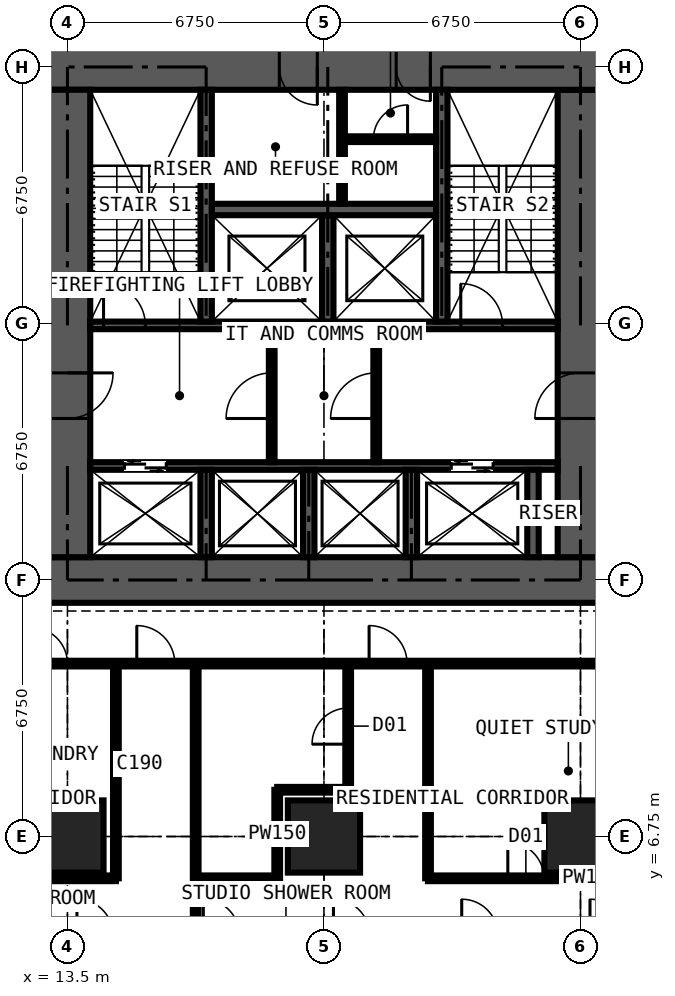
"""IFC4 building model, lengths in metres.
Left out: names, types, materials, properties, quantities, classifications, styles, units other than length and angle.
Written with IfcOpenShell. Run it as: python <this file> out.ifc"""

import sys

from ifc_helpers import new_model, si_unit, direction, frame, frame_2d, origin, origin_2d, place, context, subcontext, project, spatial, rectangle, extrude, element, fill, save


model = new_model("IFC4")
c1 = context("Model", 3, precision=1e-05, world=origin(), true_north=direction((0.0, 1.0)))
c2 = subcontext(c1, "Body", "Model", "MODEL_VIEW")
j1 = project(units=[si_unit("LENGTHUNIT", "METRE"), si_unit("PLANEANGLEUNIT", "RADIAN")], contexts=[c1])
p1 = place(None, origin())
s1 = spatial("IfcSite", under=j1, at=p1, CompositionType="ELEMENT")
p2 = place(p1, origin())
s2 = spatial("IfcBuilding", under=s1, at=p2, CompositionType="ELEMENT")
p3 = place(p2, frame((0.0, 0.0, 36.0)))
s3 = spatial("IfcBuildingStorey", under=s2, at=p3, CompositionType="ELEMENT", Elevation=36.0)
for number, where, z_axis, x_axis in (
    (1, (13.5, 6.75, 0.0), (0.0, 0.0, 1.0), (1.0, 0.0, 0.0)),
    (2, (20.25, 6.75, 0.0), (0.0, 0.0, 1.0), (1.0, 0.0, 0.0)),
    (3, (27.0, 6.75, 0.0), (0.0, 0.0, 1.0), (1.0, 0.0, 0.0)),
):
    element("IfcColumn", number, at=place(p3, frame(where, z_axis=z_axis, x_axis=x_axis)), inside=s3, PredefinedType="COLUMN", context=c2, shape_type="SweptSolid", body=[
        extrude(rectangle(XDim=1.9, YDim=1.9, at=origin_2d()), origin(), (0.0, 0.0, 1.0), 3.6),
    ])
p4 = place(p3, frame((12.9, 13.5, 0.0), z_axis=(0.0, 0.0, 1.0), x_axis=(1.0, 0.0, 0.0)))
e4 = element("IfcWall", 4, at=p4, inside=s3, PredefinedType="SHEAR", context=c2, shape_type="SweptSolid", body=[
    extrude(rectangle(XDim=14.7, YDim=1.2, at=frame_2d((7.35, 0.0))), origin(), (0.0, 0.0, 1.0), 3.6),
])
p5 = place(p3, frame((27.0, 14.1, 0.0), z_axis=(0.0, 0.0, 1.0), x_axis=(0.0, 1.0, 0.0)))
e5 = element("IfcWall", 5, at=p5, inside=s3, PredefinedType="SHEAR", context=c2, shape_type="SweptSolid", body=[
    extrude(rectangle(XDim=12.3, YDim=1.2, at=frame_2d((6.15, 0.0))), origin(), (0.0, 0.0, 1.0), 3.6),
])
p6 = place(p5, frame((3.65, 0.0, 0.0)))
e6 = element("IfcOpeningElement", 6, at=p6, cuts=e5, PredefinedType="OPENING", context=c2, shape_type="SweptSolid", body=[
    extrude(rectangle(XDim=1.2, YDim=2.2, at=frame_2d((0.6, 1.1))), frame((0.0, 0.61, 0.0), z_axis=(0.0, -1.0, 0.0), x_axis=(1.0, 0.0, 0.0)), (0.0, 0.0, 1.0), 1.22),
])
p7 = place(p3, frame((27.6, 27.0, 0.0), z_axis=(0.0, 0.0, 1.0), x_axis=(-1.0, 0.0, 0.0)))
e7 = element("IfcWall", 7, at=p7, inside=s3, PredefinedType="SHEAR", context=c2, shape_type="SweptSolid", body=[
    extrude(rectangle(XDim=14.7, YDim=1.2, at=frame_2d((7.35, 0.0))), origin(), (0.0, 0.0, 1.0), 3.6),
])
p8 = place(p7, frame((4.55, 0.0, 0.0)))
e8 = element("IfcOpeningElement", 8, at=p8, cuts=e7, PredefinedType="OPENING", context=c2, shape_type="SweptSolid", body=[
    extrude(rectangle(XDim=0.9, YDim=2.2, at=frame_2d((0.45, 1.1))), frame((0.0, 0.61, 0.0), z_axis=(0.0, -1.0, 0.0), x_axis=(1.0, 0.0, 0.0)), (0.0, 0.0, 1.0), 1.22),
])
p9 = place(p7, frame((7.525, 0.0, 0.0)))
e9 = element("IfcOpeningElement", 9, at=p9, cuts=e7, PredefinedType="OPENING", context=c2, shape_type="SweptSolid", body=[
    extrude(rectangle(XDim=1.0, YDim=2.2, at=frame_2d((0.5, 1.1))), frame((0.0, 0.61, 0.0), z_axis=(0.0, -1.0, 0.0), x_axis=(1.0, 0.0, 0.0)), (0.0, 0.0, 1.0), 1.22),
])
p10 = place(p3, frame((13.5, 26.4, 0.0), z_axis=(0.0, 0.0, 1.0), x_axis=(0.0, -1.0, 0.0)))
e10 = element("IfcWall", 10, at=p10, inside=s3, PredefinedType="SHEAR", context=c2, shape_type="SweptSolid", body=[
    extrude(rectangle(XDim=12.3, YDim=1.2, at=frame_2d((6.15, 0.0))), origin(), (0.0, 0.0, 1.0), 3.6),
])
p11 = place(p10, frame((7.45, 0.0, 0.0)))
e11 = element("IfcOpeningElement", 11, at=p11, cuts=e10, PredefinedType="OPENING", context=c2, shape_type="SweptSolid", body=[
    extrude(rectangle(XDim=1.2, YDim=2.2, at=frame_2d((0.6, 1.1))), frame((0.0, 0.61, 0.0), z_axis=(0.0, -1.0, 0.0), x_axis=(1.0, 0.0, 0.0)), (0.0, 0.0, 1.0), 1.22),
])
p12 = place(p3, frame((14.1, 16.5, 0.0), z_axis=(0.0, 0.0, 1.0), x_axis=(1.0, 0.0, 0.0)))
e12 = element("IfcWall", 12, at=p12, inside=s3, PredefinedType="SHEAR", context=c2, shape_type="SweptSolid", body=[
    extrude(rectangle(XDim=12.3, YDim=0.2, at=frame_2d((6.15, 0.0))), origin(), (0.0, 0.0, 1.0), 3.6),
])
p13 = place(p12, frame((0.9, 0.0, 0.0)))
e13 = element("IfcOpeningElement", 13, at=p13, cuts=e12, PredefinedType="OPENING", context=c2, shape_type="SweptSolid", body=[
    extrude(rectangle(XDim=1.1, YDim=2.2, at=frame_2d((0.55, 1.1))), frame((0.0, 0.11, 0.0), z_axis=(0.0, -1.0, 0.0), x_axis=(1.0, 0.0, 0.0)), (0.0, 0.0, 1.0), 0.22),
])
p14 = place(p12, frame((9.5, 0.0, 0.0)))
e14 = element("IfcOpeningElement", 14, at=p14, cuts=e12, PredefinedType="OPENING", context=c2, shape_type="SweptSolid", body=[
    extrude(rectangle(XDim=1.1, YDim=2.2, at=frame_2d((0.55, 1.1))), frame((0.0, 0.11, 0.0), z_axis=(0.0, -1.0, 0.0), x_axis=(1.0, 0.0, 0.0)), (0.0, 0.0, 1.0), 0.22),
])
p15 = place(p3, frame((14.1, 20.2, 0.0), z_axis=(0.0, 0.0, 1.0), x_axis=(1.0, 0.0, 0.0)))
e15 = element("IfcWall", 15, at=p15, inside=s3, PredefinedType="SHEAR", context=c2, shape_type="SweptSolid", body=[
    extrude(rectangle(XDim=12.3, YDim=0.2, at=frame_2d((6.15, 0.0))), origin(), (0.0, 0.0, 1.0), 3.6),
])
p16 = place(p15, frame((0.35, 0.0, 0.0)))
e16 = element("IfcOpeningElement", 16, at=p16, cuts=e15, PredefinedType="OPENING", context=c2, shape_type="SweptSolid", body=[
    extrude(rectangle(XDim=1.1, YDim=2.2, at=frame_2d((0.55, 1.1))), frame((0.0, 0.11, 0.0), z_axis=(0.0, -1.0, 0.0), x_axis=(1.0, 0.0, 0.0)), (0.0, 0.0, 1.0), 0.22),
])
p17 = place(p15, frame((9.75, 0.0, 0.0)))
e17 = element("IfcOpeningElement", 17, at=p17, cuts=e15, PredefinedType="OPENING", context=c2, shape_type="SweptSolid", body=[
    extrude(rectangle(XDim=1.1, YDim=2.2, at=frame_2d((0.55, 1.1))), frame((0.0, 0.11, 0.0), z_axis=(0.0, -1.0, 0.0), x_axis=(1.0, 0.0, 0.0)), (0.0, 0.0, 1.0), 0.22),
])
for number, where, z_axis, x_axis in (
    (18, (17.15, 20.3, 0.0), (0.0, 0.0, 1.0), (0.0, 1.0, 0.0)),
    (19, (23.35, 20.3, 0.0), (0.0, 0.0, 1.0), (0.0, 1.0, 0.0)),
):
    element("IfcWall", number, at=place(p3, frame(where, z_axis=z_axis, x_axis=x_axis)), inside=s3, PredefinedType="SHEAR", context=c2, shape_type="SweptSolid", body=[
        extrude(rectangle(XDim=6.1, YDim=0.3, at=frame_2d((3.05, 0.0))), origin(), (0.0, 0.0, 1.0), 3.6),
    ])
p18 = place(p3, frame((20.35, 20.3, 0.0), z_axis=(0.0, 0.0, 1.0), x_axis=(0.0, 1.0, 0.0)))
e20 = element("IfcWall", 20, at=p18, inside=s3, PredefinedType="SHEAR", context=c2, shape_type="SweptSolid", body=[
    extrude(rectangle(XDim=2.8, YDim=0.3, at=frame_2d((1.4, 0.0))), origin(), (0.0, 0.0, 1.0), 3.6),
])
p19 = place(p3, frame((17.3, 23.25, 0.0), z_axis=(0.0, 0.0, 1.0), x_axis=(1.0, 0.0, 0.0)))
e21 = element("IfcWall", 21, at=p19, inside=s3, PredefinedType="SHEAR", context=c2, shape_type="SweptSolid", body=[
    extrude(rectangle(XDim=5.9, YDim=0.3, at=frame_2d((2.95, 0.0))), origin(), (0.0, 0.0, 1.0), 3.6),
])
for number, where, z_axis, x_axis in (
    (22, (17.15, 14.1, 0.0), (0.0, 0.0, 1.0), (0.0, 1.0, 0.0)),
    (23, (19.85, 14.1, 0.0), (0.0, 0.0, 1.0), (0.0, 1.0, 0.0)),
    (24, (22.55, 14.1, 0.0), (0.0, 0.0, 1.0), (0.0, 1.0, 0.0)),
    (25, (25.75, 14.1, 0.0), (0.0, 0.0, 1.0), (0.0, 1.0, 0.0)),
):
    element("IfcWall", number, at=place(p3, frame(where, z_axis=z_axis, x_axis=x_axis)), inside=s3, PredefinedType="SHEAR", context=c2, shape_type="SweptSolid", body=[
        extrude(rectangle(XDim=2.3, YDim=0.3, at=frame_2d((1.15, 0.0))), origin(), (0.0, 0.0, 1.0), 3.6),
    ])
p20 = place(p3, frame((18.875, 16.6, 0.0), z_axis=(0.0, 0.0, 1.0), x_axis=(0.0, 1.0, 0.0)))
e26 = element("IfcWall", 26, at=p20, inside=s3, PredefinedType="PARTITIONING", context=c2, shape_type="SweptSolid", body=[
    extrude(rectangle(XDim=3.5, YDim=0.15, at=frame_2d((1.75, 0.0))), origin(), (0.0, 0.0, 1.0), 3.375),
])
p21 = place(p20, frame((1.15, 0.0, 0.0)))
e27 = element("IfcOpeningElement", 27, at=p21, cuts=e26, PredefinedType="OPENING", context=c2, shape_type="SweptSolid", body=[
    extrude(rectangle(XDim=1.2, YDim=2.2, at=frame_2d((0.6, 1.1))), frame((0.0, 0.085, 0.0), z_axis=(0.0, -1.0, 0.0), x_axis=(1.0, 0.0, 0.0)), (0.0, 0.0, 1.0), 0.17),
])
p22 = place(p3, frame((21.625, 16.6, 0.0), z_axis=(0.0, 0.0, 1.0), x_axis=(0.0, 1.0, 0.0)))
e28 = element("IfcWall", 28, at=p22, inside=s3, PredefinedType="PARTITIONING", context=c2, shape_type="SweptSolid", body=[
    extrude(rectangle(XDim=3.5, YDim=0.15, at=frame_2d((1.75, 0.0))), origin(), (0.0, 0.0, 1.0), 3.375),
])
p23 = place(p22, frame((1.15, 0.0, 0.0)))
e29 = element("IfcOpeningElement", 29, at=p23, cuts=e28, PredefinedType="OPENING", context=c2, shape_type="SweptSolid", body=[
    extrude(rectangle(XDim=1.2, YDim=2.2, at=frame_2d((0.6, 1.1))), frame((0.0, 0.085, 0.0), z_axis=(0.0, -1.0, 0.0), x_axis=(1.0, 0.0, 0.0)), (0.0, 0.0, 1.0), 0.17),
])
p24 = place(p3, frame((20.725, 23.4, 0.0), z_axis=(0.0, 0.0, 1.0), x_axis=(0.0, 1.0, 0.0)))
e30 = element("IfcWall", 30, at=p24, inside=s3, PredefinedType="PARTITIONING", context=c2, shape_type="SweptSolid", body=[
    extrude(rectangle(XDim=3.0, YDim=0.15, at=frame_2d((1.5, 0.0))), origin(), (0.0, 0.0, 1.0), 3.375),
])
p25 = place(p3, frame((20.8, 25.1, 0.0), z_axis=(0.0, 0.0, 1.0), x_axis=(1.0, 0.0, 0.0)))
e31 = element("IfcWall", 31, at=p25, inside=s3, PredefinedType="PARTITIONING", context=c2, shape_type="SweptSolid", body=[
    extrude(rectangle(XDim=2.4, YDim=0.15, at=frame_2d((1.2, 0.0))), origin(), (0.0, 0.0, 1.0), 3.375),
])
p26 = place(p25, frame((0.75, 0.0, 0.0)))
e32 = element("IfcOpeningElement", 32, at=p26, cuts=e31, PredefinedType="OPENING", context=c2, shape_type="SweptSolid", body=[
    extrude(rectangle(XDim=0.9, YDim=2.2, at=frame_2d((0.45, 1.1))), frame((0.0, 0.085, 0.0), z_axis=(0.0, -1.0, 0.0), x_axis=(1.0, 0.0, 0.0)), (0.0, 0.0, 1.0), 0.17),
])
p27 = place(p3, frame((9.2, 5.65, 0.0), z_axis=(0.0, 0.0, 1.0), x_axis=(1.0, 0.0, 0.0)))
e33 = element("IfcWall", 33, at=p27, inside=s3, PredefinedType="PARTITIONING", context=c2, shape_type="SweptSolid", body=[
    extrude(rectangle(XDim=5.575, YDim=0.15, at=frame_2d((2.788, 0.0))), origin(), (0.0, 0.0, 1.0), 3.375),
])
p28 = place(p3, frame((10.125, 11.3, 0.0), z_axis=(0.0, 0.0, 1.0), x_axis=(1.0, 0.0, 0.0)))
e34 = element("IfcWall", 34, at=p28, inside=s3, PredefinedType="PARTITIONING", context=c2, shape_type="SweptSolid", body=[
    extrude(rectangle(XDim=20.675, YDim=0.15, at=frame_2d((10.337, 0.0))), origin(), (0.0, 0.0, 1.0), 3.375),
])
p29 = place(p28, frame((5.2, 0.0, 0.0)))
e35 = element("IfcOpeningElement", 35, at=p29, cuts=e34, PredefinedType="OPENING", context=c2, shape_type="SweptSolid", body=[
    extrude(rectangle(XDim=1.0, YDim=2.2, at=frame_2d((0.5, 1.1))), frame((0.0, 0.085, 0.0), z_axis=(0.0, -1.0, 0.0), x_axis=(1.0, 0.0, 0.0)), (0.0, 0.0, 1.0), 0.17),
])
p30 = place(p28, frame((11.312, 0.0, 0.0)))
e36 = element("IfcOpeningElement", 36, at=p30, cuts=e34, PredefinedType="OPENING", context=c2, shape_type="SweptSolid", body=[
    extrude(rectangle(XDim=1.0, YDim=2.2, at=frame_2d((0.5, 1.1))), frame((0.0, 0.085, 0.0), z_axis=(0.0, -1.0, 0.0), x_axis=(1.0, 0.0, 0.0)), (0.0, 0.0, 1.0), 0.17),
])
p31 = place(p28, frame((2.425, 0.0, 0.0)))
e37 = element("IfcOpeningElement", 37, at=p31, cuts=e34, PredefinedType="OPENING", context=c2, shape_type="SweptSolid", body=[
    extrude(rectangle(XDim=0.95, YDim=2.2, at=frame_2d((0.475, 1.1))), frame((0.0, 0.085, 0.0), z_axis=(0.0, -1.0, 0.0), x_axis=(1.0, 0.0, 0.0)), (0.0, 0.0, 1.0), 0.17),
])
p32 = place(p3, frame((14.775, 5.65, 0.0), z_axis=(0.0, 0.0, 1.0), x_axis=(0.0, 1.0, 0.0)))
e38 = element("IfcWall", 38, at=p32, inside=s3, PredefinedType="PARTITIONING", context=c2, shape_type="SweptSolid", body=[
    extrude(rectangle(XDim=5.65, YDim=0.15, at=frame_2d((2.825, 0.0))), origin(), (0.0, 0.0, 1.0), 3.375),
])
p33 = place(p3, frame((16.875, -0.734, 0.0), z_axis=(0.0, 0.0, 1.0), x_axis=(0.0, 1.0, 0.0)))
e39 = element("IfcWall", 39, at=p33, inside=s3, PredefinedType="PARTITIONING", context=c2, shape_type="SweptSolid", body=[
    extrude(rectangle(XDim=12.034, YDim=0.15, at=frame_2d((6.017, 0.0))), origin(), (0.0, 0.0, 1.0), 3.375),
])
p34 = place(p3, frame((16.875, 5.65, 0.0), z_axis=(0.0, 0.0, 1.0), x_axis=(1.0, 0.0, 0.0)))
e40 = element("IfcWall", 40, at=p34, inside=s3, PredefinedType="PARTITIONING", context=c2, shape_type="SweptSolid", body=[
    extrude(rectangle(XDim=2.145, YDim=0.15, at=frame_2d((1.073, 0.0))), origin(), (0.0, 0.0, 1.0), 3.375),
])
p35 = place(p3, frame((19.02, 5.65, 0.0), z_axis=(0.0, 0.0, 1.0), x_axis=(0.0, 1.0, 0.0)))
e41 = element("IfcWall", 41, at=p35, inside=s3, PredefinedType="PARTITIONING", context=c2, shape_type="SweptSolid", body=[
    extrude(rectangle(XDim=2.33, YDim=0.15, at=frame_2d((1.165, 0.0))), origin(), (0.0, 0.0, 1.0), 3.375),
])
p36 = place(p3, frame((19.02, 7.98, 0.0), z_axis=(0.0, 0.0, 1.0), x_axis=(1.0, 0.0, 0.0)))
e42 = element("IfcWall", 42, at=p36, inside=s3, PredefinedType="PARTITIONING", context=c2, shape_type="SweptSolid", body=[
    extrude(rectangle(XDim=1.867, YDim=0.15, at=frame_2d((0.934, 0.0))), origin(), (0.0, 0.0, 1.0), 3.375),
])
p37 = place(p3, frame((20.887, 7.98, 0.0), z_axis=(0.0, 0.0, 1.0), x_axis=(0.0, 1.0, 0.0)))
e43 = element("IfcWall", 43, at=p37, inside=s3, PredefinedType="PARTITIONING", context=c2, shape_type="SweptSolid", body=[
    extrude(rectangle(XDim=3.32, YDim=0.15, at=frame_2d((1.66, 0.0))), origin(), (0.0, 0.0, 1.0), 3.375),
])
p38 = place(p37, frame((1.2, 0.0, 0.0)))
e44 = element("IfcOpeningElement", 44, at=p38, cuts=e43, PredefinedType="OPENING", context=c2, shape_type="SweptSolid", body=[
    extrude(rectangle(XDim=0.95, YDim=2.2, at=frame_2d((0.475, 1.1))), frame((0.0, 0.085, 0.0), z_axis=(0.0, -1.0, 0.0), x_axis=(1.0, 0.0, 0.0)), (0.0, 0.0, 1.0), 0.17),
])
p39 = place(p3, frame((22.988, 5.65, 0.0), z_axis=(0.0, 0.0, 1.0), x_axis=(1.0, 0.0, 0.0)))
e45 = element("IfcWall", 45, at=p39, inside=s3, PredefinedType="PARTITIONING", context=c2, shape_type="SweptSolid", body=[
    extrude(rectangle(XDim=7.387, YDim=0.15, at=frame_2d((3.694, 0.0))), origin(), (0.0, 0.0, 1.0), 3.375),
])
p40 = place(p39, frame((2.1, 0.0, 0.0)))
e46 = element("IfcOpeningElement", 46, at=p40, cuts=e45, PredefinedType="OPENING", context=c2, shape_type="SweptSolid", body=[
    extrude(rectangle(XDim=0.95, YDim=2.2, at=frame_2d((0.475, 1.1))), frame((0.0, 0.085, 0.0), z_axis=(0.0, -1.0, 0.0), x_axis=(1.0, 0.0, 0.0)), (0.0, 0.0, 1.0), 0.17),
])
p41 = place(p3, frame((22.988, 5.65, 0.0), z_axis=(0.0, 0.0, 1.0), x_axis=(0.0, 1.0, 0.0)))
e47 = element("IfcWall", 47, at=p41, inside=s3, PredefinedType="PARTITIONING", context=c2, shape_type="SweptSolid", body=[
    extrude(rectangle(XDim=5.65, YDim=0.15, at=frame_2d((2.825, 0.0))), origin(), (0.0, 0.0, 1.0), 3.375),
])
p42 = place(p13, origin())
e48 = element("IfcDoor", 48, at=p42, inside=s3, OperationType="DOUBLE_DOOR_SLIDING", PredefinedType="DOOR", context=c2, shape_type="SweptSolid", body=[
    extrude(rectangle(XDim=1.1, YDim=2.2, at=frame_2d((0.55, 1.1))), frame((0.0, 0.025, 0.0), z_axis=(0.0, -1.0, 0.0), x_axis=(1.0, 0.0, 0.0)), (0.0, 0.0, 1.0), 0.05),
])
fill(e13, e48)
p43 = place(p14, origin())
e49 = element("IfcDoor", 49, at=p43, inside=s3, OperationType="DOUBLE_DOOR_SLIDING", PredefinedType="DOOR", context=c2, shape_type="SweptSolid", body=[
    extrude(rectangle(XDim=1.1, YDim=2.2, at=frame_2d((0.55, 1.1))), frame((0.0, 0.025, 0.0), z_axis=(0.0, -1.0, 0.0), x_axis=(1.0, 0.0, 0.0)), (0.0, 0.0, 1.0), 0.05),
])
fill(e14, e49)
p44 = place(p11, origin())
e50 = element("IfcDoor", 50, at=p44, inside=s3, OperationType="DOUBLE_DOOR_SINGLE_SWING", PredefinedType="DOOR", context=c2, shape_type="SweptSolid", body=[
    extrude(rectangle(XDim=1.2, YDim=2.2, at=frame_2d((0.6, 1.1))), frame((0.0, 0.025, 0.0), z_axis=(0.0, -1.0, 0.0), x_axis=(1.0, 0.0, 0.0)), (0.0, 0.0, 1.0), 0.05),
])
fill(e11, e50)
p45 = place(p6, origin())
e51 = element("IfcDoor", 51, at=p45, inside=s3, OperationType="DOUBLE_DOOR_SINGLE_SWING", PredefinedType="DOOR", context=c2, shape_type="SweptSolid", body=[
    extrude(rectangle(XDim=1.2, YDim=2.2, at=frame_2d((0.6, 1.1))), frame((0.0, 0.025, 0.0), z_axis=(0.0, -1.0, 0.0), x_axis=(1.0, 0.0, 0.0)), (0.0, 0.0, 1.0), 0.05),
])
fill(e6, e51)
p46 = place(p21, origin())
e52 = element("IfcDoor", 52, at=p46, inside=s3, OperationType="DOUBLE_DOOR_SINGLE_SWING", PredefinedType="DOOR", context=c2, shape_type="SweptSolid", body=[
    extrude(rectangle(XDim=1.2, YDim=2.2, at=frame_2d((0.6, 1.1))), frame((0.0, 0.025, 0.0), z_axis=(0.0, -1.0, 0.0), x_axis=(1.0, 0.0, 0.0)), (0.0, 0.0, 1.0), 0.05),
])
fill(e27, e52)
p47 = place(p23, origin())
e53 = element("IfcDoor", 53, at=p47, inside=s3, OperationType="DOUBLE_DOOR_SINGLE_SWING", PredefinedType="DOOR", context=c2, shape_type="SweptSolid", body=[
    extrude(rectangle(XDim=1.2, YDim=2.2, at=frame_2d((0.6, 1.1))), frame((0.0, 0.025, 0.0), z_axis=(0.0, -1.0, 0.0), x_axis=(1.0, 0.0, 0.0)), (0.0, 0.0, 1.0), 0.05),
])
fill(e29, e53)
p48 = place(p26, origin())
e54 = element("IfcDoor", 54, at=p48, inside=s3, OperationType="SINGLE_SWING_RIGHT", PredefinedType="DOOR", context=c2, shape_type="SweptSolid", body=[
    extrude(rectangle(XDim=0.9, YDim=2.2, at=frame_2d((0.45, 1.1))), frame((0.0, 0.025, 0.0), z_axis=(0.0, -1.0, 0.0), x_axis=(1.0, 0.0, 0.0)), (0.0, 0.0, 1.0), 0.05),
])
fill(e32, e54)
p49 = place(p8, origin())
e55 = element("IfcDoor", 55, at=p49, inside=s3, OperationType="SINGLE_SWING_LEFT", PredefinedType="DOOR", context=c2, shape_type="SweptSolid", body=[
    extrude(rectangle(XDim=0.9, YDim=2.2, at=frame_2d((0.45, 1.1))), frame((0.0, 0.4, 0.0), z_axis=(0.0, -1.0, 0.0), x_axis=(1.0, 0.0, 0.0)), (0.0, 0.0, 1.0), 0.8),
])
fill(e8, e55)
p50 = place(p9, origin())
e56 = element("IfcDoor", 56, at=p50, inside=s3, OperationType="SINGLE_SWING_LEFT", PredefinedType="DOOR", context=c2, shape_type="SweptSolid", body=[
    extrude(rectangle(XDim=1.0, YDim=2.2, at=frame_2d((0.5, 1.1))), frame((0.0, 0.025, 0.0), z_axis=(0.0, -1.0, 0.0), x_axis=(1.0, 0.0, 0.0)), (0.0, 0.0, 1.0), 0.05),
])
fill(e9, e56)
p51 = place(p16, origin())
e57 = element("IfcDoor", 57, at=p51, inside=s3, OperationType="SINGLE_SWING_LEFT", PredefinedType="DOOR", context=c2, shape_type="SweptSolid", body=[
    extrude(rectangle(XDim=1.1, YDim=2.2, at=frame_2d((0.55, 1.1))), frame((0.0, 0.025, 0.0), z_axis=(0.0, -1.0, 0.0), x_axis=(1.0, 0.0, 0.0)), (0.0, 0.0, 1.0), 0.05),
])
fill(e16, e57)
p52 = place(p17, origin())
e58 = element("IfcDoor", 58, at=p52, inside=s3, OperationType="SINGLE_SWING_LEFT", PredefinedType="DOOR", context=c2, shape_type="SweptSolid", body=[
    extrude(rectangle(XDim=1.1, YDim=2.2, at=frame_2d((0.55, 1.1))), frame((0.0, 0.025, 0.0), z_axis=(0.0, -1.0, 0.0), x_axis=(1.0, 0.0, 0.0)), (0.0, 0.0, 1.0), 0.05),
])
fill(e17, e58)
p53 = place(p29, origin())
e59 = element("IfcDoor", 59, at=p53, inside=s3, OperationType="SINGLE_SWING_LEFT", PredefinedType="DOOR", context=c2, shape_type="SweptSolid", body=[
    extrude(rectangle(XDim=1.0, YDim=2.2, at=frame_2d((0.5, 1.1))), frame((0.0, 0.025, 0.0), z_axis=(0.0, -1.0, 0.0), x_axis=(1.0, 0.0, 0.0)), (0.0, 0.0, 1.0), 0.05),
])
fill(e35, e59)
p54 = place(p30, origin())
e60 = element("IfcDoor", 60, at=p54, inside=s3, OperationType="SINGLE_SWING_LEFT", PredefinedType="DOOR", context=c2, shape_type="SweptSolid", body=[
    extrude(rectangle(XDim=1.0, YDim=2.2, at=frame_2d((0.5, 1.1))), frame((0.0, 0.025, 0.0), z_axis=(0.0, -1.0, 0.0), x_axis=(1.0, 0.0, 0.0)), (0.0, 0.0, 1.0), 0.05),
])
fill(e36, e60)
p55 = place(p31, origin())
e61 = element("IfcDoor", 61, at=p55, inside=s3, OperationType="SINGLE_SWING_LEFT", PredefinedType="DOOR", context=c2, shape_type="SweptSolid", body=[
    extrude(rectangle(XDim=0.95, YDim=2.2, at=frame_2d((0.475, 1.1))), frame((0.0, 0.025, 0.0), z_axis=(0.0, -1.0, 0.0), x_axis=(1.0, 0.0, 0.0)), (0.0, 0.0, 1.0), 0.05),
])
fill(e37, e61)
p56 = place(p40, origin())
e62 = element("IfcDoor", 62, at=p56, inside=s3, OperationType="SINGLE_SWING_LEFT", PredefinedType="DOOR", context=c2, shape_type="SweptSolid", body=[
    extrude(rectangle(XDim=0.95, YDim=2.2, at=frame_2d((0.475, 1.1))), frame((0.0, 0.025, 0.0), z_axis=(0.0, -1.0, 0.0), x_axis=(1.0, 0.0, 0.0)), (0.0, 0.0, 1.0), 0.05),
])
fill(e46, e62)
p57 = place(p38, origin())
e63 = element("IfcDoor", 63, at=p57, inside=s3, OperationType="SINGLE_SWING_LEFT", PredefinedType="DOOR", context=c2, shape_type="SweptSolid", body=[
    extrude(rectangle(XDim=0.95, YDim=2.2, at=frame_2d((0.475, 1.1))), frame((0.0, 0.025, 0.0), z_axis=(0.0, -1.0, 0.0), x_axis=(1.0, 0.0, 0.0)), (0.0, 0.0, 1.0), 0.05),
])
fill(e44, e63)
save(model, sys.argv[1])
